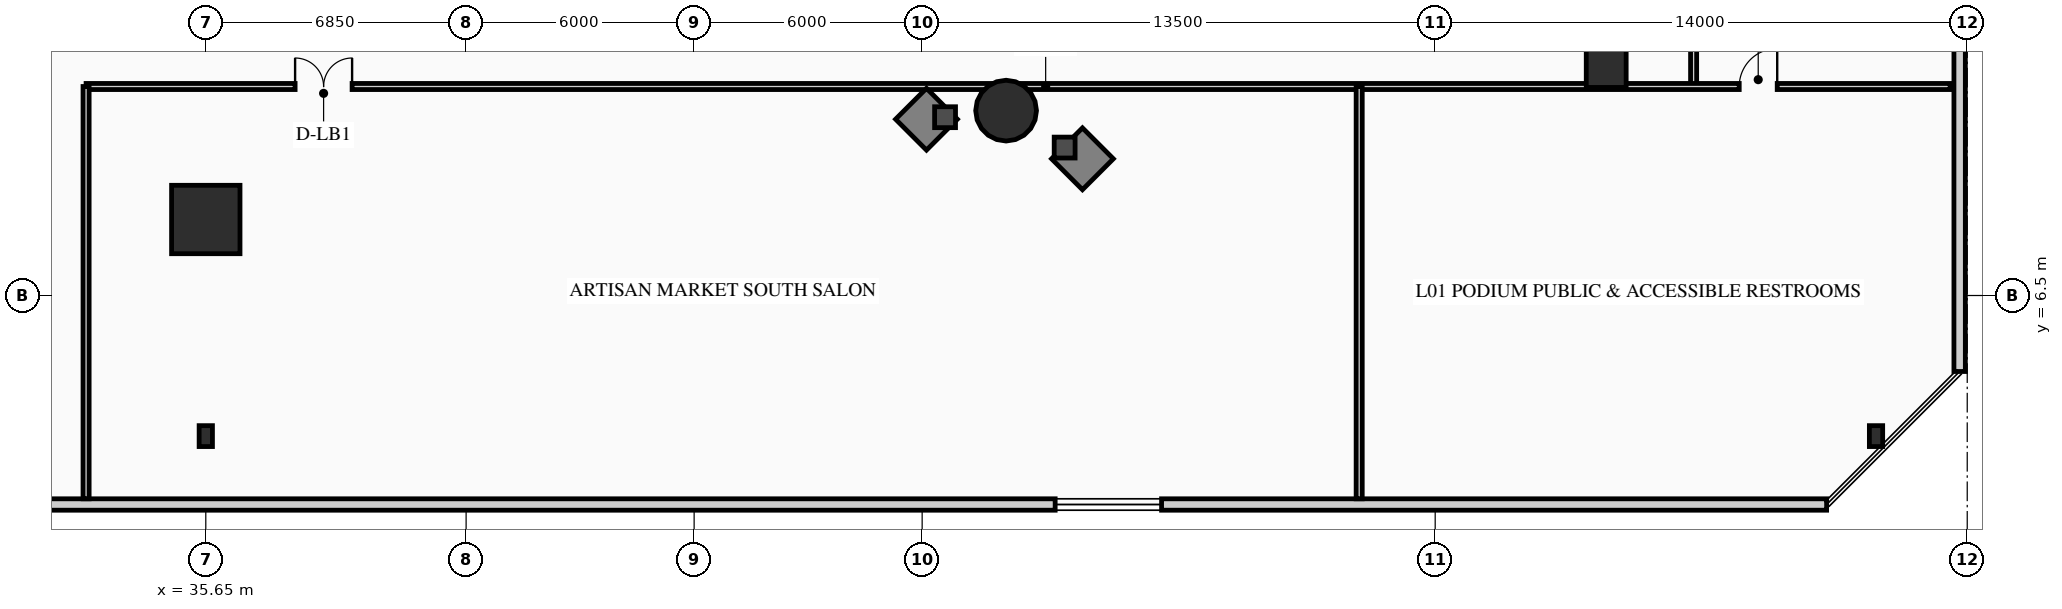
"""IFC4 building model, lengths in metres.
Left out: names, types, materials, properties, quantities, classifications, styles, units other than length and angle.
Written with IfcOpenShell. Run it as: python <this file> out.ifc"""

import sys

from ifc_helpers import new_model, si_unit, direction, frame, frame_2d, origin, origin_2d, place, context, subcontext, project, spatial, rectangle, hollow_rectangle, circle, extrude, source, transform, mapped, element, fill, save


model = new_model("IFC4")
c1 = context("Model", 3, precision=1e-05, world=origin(), true_north=direction((0.0, 1.0)))
c2 = subcontext(c1, "Body", "Model", "MODEL_VIEW")
j1 = project(units=[si_unit("LENGTHUNIT", "METRE"), si_unit("PLANEANGLEUNIT", "RADIAN")], contexts=[c1])
p1 = place(None, origin())
s1 = spatial("IfcSite", under=j1, at=p1, CompositionType="ELEMENT")
p2 = place(p1, origin())
s2 = spatial("IfcBuilding", under=s1, at=p2, CompositionType="ELEMENT")
p3 = place(p2, frame((0.0, 0.0, 4.8)))
s3 = spatial("IfcBuildingStorey", under=s2, at=p3, CompositionType="ELEMENT", Elevation=4.8)
p4 = place(p3, frame((56.709, 11.365, 0.0), z_axis=(0.0, 0.0, 1.0), x_axis=(1.0, 0.0, 0.0)))
e1 = element("IfcColumn", 1, at=p4, inside=s3, PredefinedType="USERDEFINED", context=c2, shape_type="SweptSolid", body=[
    extrude(circle(Radius=0.8, at=origin_2d()), origin(), (0.0, 0.0, 1.0), 4.2),
])
p5 = place(p3, frame((35.65, 8.5, 0.0), z_axis=(0.0, 0.0, 1.0), x_axis=(1.0, 0.0, 0.0)))
e2 = element("IfcColumn", 2, at=p5, inside=s3, PredefinedType="USERDEFINED", context=c2, shape_type="SweptSolid", body=[
    extrude(rectangle(XDim=1.8, YDim=1.8, at=origin_2d()), origin(), (0.0, 0.0, 1.0), 4.2),
])
for number, where, z_axis, x_axis in (
    (3, (35.65, 2.8, 0.0), (0.0, 0.0, 1.0), (1.0, 0.0, 0.0)),
    (4, (79.6, 2.8, 0.0), (0.0, 0.0, 1.0), (1.0, 0.0, 0.0)),
):
    element("IfcColumn", number, at=place(p3, frame(where, z_axis=z_axis, x_axis=x_axis)), inside=s3, PredefinedType="PILASTER", context=c2, shape_type="SweptSolid", body=[
        extrude(hollow_rectangle(XDim=0.35, YDim=0.55, WallThickness=0.022, at=origin_2d()), origin(), (0.0, 0.0, 1.0), 4.2),
    ])
p6 = place(p3, frame((72.5, 12.5, 0.0), z_axis=(0.0, 0.0, 1.0), x_axis=(1.0, 0.0, 0.0)))
e5 = element("IfcColumn", 5, at=p6, inside=s3, PredefinedType="COLUMN", context=c2, shape_type="SweptSolid", body=[
    extrude(rectangle(XDim=1.05, YDim=1.05, at=origin_2d()), origin(), (0.0, 0.0, 1.0), 4.2),
])
p7 = place(p3, frame((81.8, 44.5, 0.0), z_axis=(0.0, 0.0, 1.0), x_axis=(0.0, -1.0, 0.0)))
e6 = element("IfcWall", 6, at=p7, inside=s3, PredefinedType="SOLIDWALL", context=c2, shape_type="SweptSolid", body=[
    extrude(rectangle(XDim=40.0, YDim=0.3, at=frame_2d((20.0, 0.0))), origin(), (0.0, 0.0, 1.0), 3.885),
])
m1 = source(origin(), c2, "Body", "SweptSolid", [
    extrude(rectangle(XDim=2.8, YDim=2.1, at=frame_2d((1.4, 1.05))), frame((0.0, 0.16, 0.0), z_axis=(0.0, -1.0, 0.0), x_axis=(1.0, 0.0, 0.0)), (0.0, 0.0, 1.0), 0.32),
])
p8 = place(p7, frame((6.5, 0.0, 0.8)))
e7 = element("IfcOpeningElement", 7, at=p8, cuts=e6, PredefinedType="OPENING", context=c2, shape_type="MappedRepresentation", body=[
    mapped(m1, transform((0.0, 0.0, 0.0), x_axis=(1.0, 0.0, 0.0), y_axis=(0.0, 1.0, 0.0), z_axis=(0.0, 0.0, 1.0), scale=1.0)),
])
p9 = place(p3, frame((78.3, 1.0, 0.0), z_axis=(0.0, 0.0, 1.0), x_axis=(-1.0, 0.0, 0.0)))
e8 = element("IfcWall", 8, at=p9, inside=s3, PredefinedType="SOLIDWALL", context=c2, shape_type="SweptSolid", body=[
    extrude(rectangle(XDim=74.5, YDim=0.3, at=frame_2d((37.25, 0.0))), origin(), (0.0, 0.0, 1.0), 3.885),
])
p10 = place(p9, frame((17.5, 0.0, 0.8)))
e9 = element("IfcOpeningElement", 9, at=p10, cuts=e8, PredefinedType="OPENING", context=c2, shape_type="MappedRepresentation", body=[
    mapped(m1, transform((0.0, 0.0, 0.0), x_axis=(1.0, 0.0, 0.0), y_axis=(0.0, 1.0, 0.0), z_axis=(0.0, 0.0, 1.0), scale=1.0)),
])
p11 = place(p3, frame((74.8, 12.0, 0.0), z_axis=(0.0, 0.0, 1.0), x_axis=(0.0, 1.0, 0.0)))
e10 = element("IfcWall", 10, at=p11, inside=s3, PredefinedType="PARTITIONING", context=c2, shape_type="SweptSolid", body=[
    extrude(rectangle(XDim=35.75, YDim=0.16, at=frame_2d((17.875, 0.0))), origin(), (0.0, 0.0, 1.0), 2.929),
])
m2 = source(origin(), c2, "Body", "SweptSolid", [
    extrude(rectangle(XDim=1.5, YDim=2.02, at=frame_2d((0.75, 1.01))), frame((0.0, 0.09, 0.0), z_axis=(0.0, -1.0, 0.0), x_axis=(1.0, 0.0, 0.0)), (0.0, 0.0, 1.0), 0.18),
])
p12 = place(p11, frame((14.0, 0.0, 0.0)))
e11 = element("IfcOpeningElement", 11, at=p12, cuts=e10, PredefinedType="OPENING", context=c2, shape_type="MappedRepresentation", body=[
    mapped(m2, transform((0.0, 0.0, 0.0), x_axis=(1.0, 0.0, 0.0), y_axis=(0.0, 1.0, 0.0), z_axis=(0.0, 0.0, 1.0), scale=1.0)),
])
p13 = place(p3, frame((32.5, 12.0, 0.0), z_axis=(0.0, 0.0, 1.0), x_axis=(1.0, 0.0, 0.0)))
e12 = element("IfcWall", 12, at=p13, inside=s3, PredefinedType="PARTITIONING", context=c2, shape_type="SweptSolid", body=[
    extrude(rectangle(XDim=49.05, YDim=0.16, at=frame_2d((24.525, 0.0))), origin(), (0.0, 0.0, 1.0), 2.929),
])
p14 = place(p13, frame((5.5, 0.0, 0.0)))
e13 = element("IfcOpeningElement", 13, at=p14, cuts=e12, PredefinedType="OPENING", context=c2, shape_type="MappedRepresentation", body=[
    mapped(m2, transform((0.0, 0.0, 0.0), x_axis=(1.0, 0.0, 0.0), y_axis=(0.0, 1.0, 0.0), z_axis=(0.0, 0.0, 1.0), scale=1.0)),
])
m3 = source(origin(), c2, "Body", "SweptSolid", [
    extrude(rectangle(XDim=1.0, YDim=2.015, at=frame_2d((0.5, 1.007))), frame((0.0, 0.09, 0.0), z_axis=(0.0, -1.0, 0.0), x_axis=(1.0, 0.0, 0.0)), (0.0, 0.0, 1.0), 0.18),
])
p15 = place(p13, frame((43.5, 0.0, 0.0)))
e14 = element("IfcOpeningElement", 14, at=p15, cuts=e12, PredefinedType="OPENING", context=c2, shape_type="MappedRepresentation", body=[
    mapped(m3, transform((0.0, 0.0, 0.0), x_axis=(1.0, 0.0, 0.0), y_axis=(0.0, 1.0, 0.0), z_axis=(0.0, 0.0, 1.0), scale=1.0)),
])
p16 = place(p3, frame((32.5, 1.15, 0.0), z_axis=(0.0, 0.0, 1.0), x_axis=(0.0, 1.0, 0.0)))
e15 = element("IfcWall", 15, at=p16, inside=s3, PredefinedType="PARTITIONING", context=c2, shape_type="SweptSolid", body=[
    extrude(rectangle(XDim=10.85, YDim=0.16, at=frame_2d((5.425, 0.0))), origin(), (0.0, 0.0, 1.0), 2.924),
])
p17 = place(p3, frame((66.0, 1.15, 0.0), z_axis=(0.0, 0.0, 1.0), x_axis=(0.0, 1.0, 0.0)))
e16 = element("IfcWall", 16, at=p17, inside=s3, PredefinedType="PARTITIONING", context=c2, shape_type="SweptSolid", body=[
    extrude(rectangle(XDim=10.85, YDim=0.16, at=frame_2d((5.425, 0.0))), origin(), (0.0, 0.0, 1.0), 2.929),
])
m4 = source(origin(), c2, "Body", "SweptSolid", [
    extrude(rectangle(XDim=2.8, YDim=2.1, at=frame_2d((1.4, 1.05))), frame((0.0, 0.03, 0.0), z_axis=(0.0, -1.0, 0.0), x_axis=(1.0, 0.0, 0.0)), (0.0, 0.0, 1.0), 0.06),
])
p18 = place(p10, origin())
e17 = element("IfcWindow", 17, at=p18, inside=s3, PartitioningType="TRIPLE_PANEL_VERTICAL", PredefinedType="WINDOW", context=c2, shape_type="MappedRepresentation", body=[
    mapped(m4, transform((0.0, 0.0, 0.0), x_axis=(1.0, 0.0, 0.0), y_axis=(0.0, 1.0, 0.0), z_axis=(0.0, 0.0, 1.0), scale=1.0)),
])
fill(e9, e17)
m5 = source(origin(), c2, "Body", "SweptSolid", [
    extrude(rectangle(XDim=1.5, YDim=2.02, at=frame_2d((0.75, 1.01))), frame((0.0, 0.025, 0.0), z_axis=(0.0, -1.0, 0.0), x_axis=(1.0, 0.0, 0.0)), (0.0, 0.0, 1.0), 0.05),
])
p19 = place(p14, origin())
e18 = element("IfcDoor", 18, at=p19, inside=s3, OperationType="DOUBLE_DOOR_SINGLE_SWING", PredefinedType="DOOR", context=c2, shape_type="MappedRepresentation", body=[
    mapped(m5, transform((0.0, 0.0, 0.0), x_axis=(1.0, 0.0, 0.0), y_axis=(0.0, 1.0, 0.0), z_axis=(0.0, 0.0, 1.0), scale=1.0)),
])
fill(e13, e18)
m6 = source(origin(), c2, "Body", "SweptSolid", [
    extrude(rectangle(XDim=1.0, YDim=2.015, at=frame_2d((0.5, 1.007))), frame((0.0, 0.025, 0.0), z_axis=(0.0, -1.0, 0.0), x_axis=(1.0, 0.0, 0.0)), (0.0, 0.0, 1.0), 0.05),
])
p20 = place(p15, origin())
e19 = element("IfcDoor", 19, at=p20, inside=s3, OperationType="SINGLE_SWING_RIGHT", PredefinedType="DOOR", context=c2, shape_type="MappedRepresentation", body=[
    mapped(m6, transform((0.0, 0.0, 0.0), x_axis=(1.0, 0.0, 0.0), y_axis=(0.0, 1.0, 0.0), z_axis=(0.0, 0.0, 1.0), scale=1.0)),
])
fill(e14, e19)
save(model, sys.argv[1])
